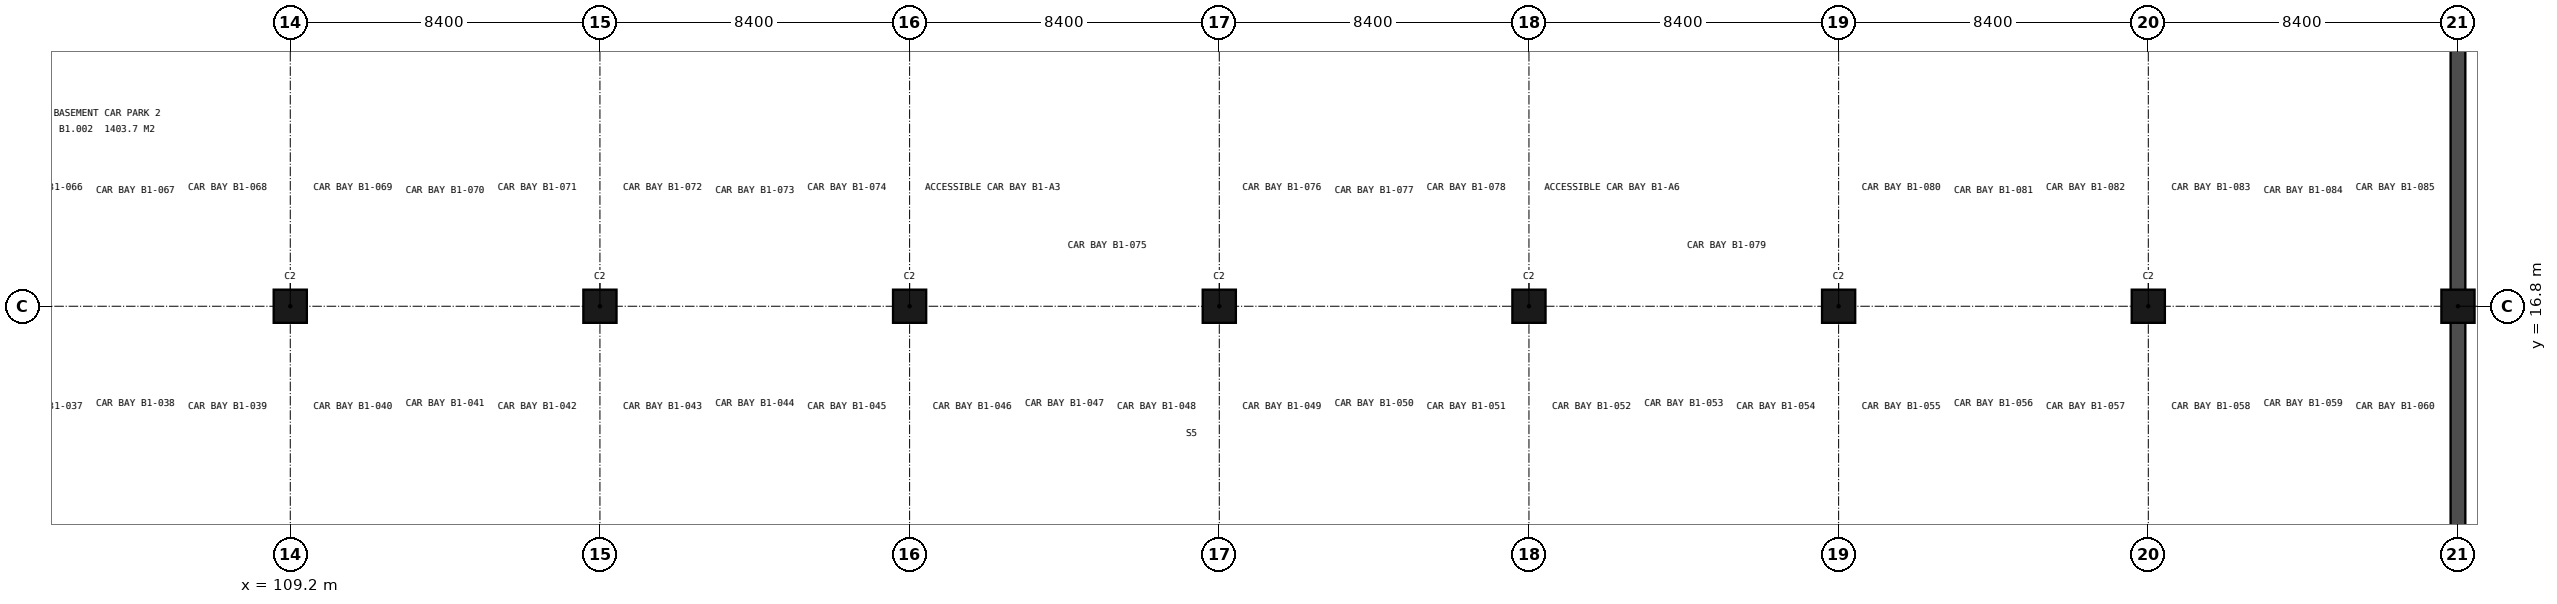
"""IFC4 building model, lengths in metres.
Left out: names, types, materials, properties, quantities, classifications, styles, units other than length and angle.
Written with IfcOpenShell. Run it as: python <this file> out.ifc"""

import sys

from ifc_helpers import new_model, si_unit, direction, frame, frame_2d, origin, origin_2d, place, context, subcontext, project, spatial, rectangle, extrude, element, save


model = new_model("IFC4")
c1 = context("Model", 3, precision=1e-05, world=origin(), true_north=direction((0.0, 1.0)))
c2 = subcontext(c1, "Body", "Model", "MODEL_VIEW")
j1 = project(units=[si_unit("LENGTHUNIT", "METRE"), si_unit("PLANEANGLEUNIT", "RADIAN")], contexts=[c1])
p1 = place(None, origin())
s1 = spatial("IfcSite", under=j1, at=p1, CompositionType="ELEMENT")
p2 = place(p1, origin())
s2 = spatial("IfcBuilding", under=s1, at=p2, CompositionType="ELEMENT")
p3 = place(p2, frame((0.0, 0.0, -4.8)))
s3 = spatial("IfcBuildingStorey", under=s2, at=p3, CompositionType="ELEMENT", Elevation=-4.8)
for number, where, z_axis, x_axis in (
    (1, (109.2, 16.8, -0.3), (0.0, 0.0, 1.0), (1.0, 0.0, 0.0)),
    (2, (117.6, 16.8, -0.3), (0.0, 0.0, 1.0), (1.0, 0.0, 0.0)),
    (3, (126.0, 16.8, -0.3), (0.0, 0.0, 1.0), (1.0, 0.0, 0.0)),
    (4, (134.4, 16.8, -0.3), (0.0, 0.0, 1.0), (1.0, 0.0, 0.0)),
    (5, (142.8, 16.8, -0.3), (0.0, 0.0, 1.0), (1.0, 0.0, 0.0)),
    (6, (151.2, 16.8, -0.3), (0.0, 0.0, 1.0), (1.0, 0.0, 0.0)),
    (7, (159.6, 16.8, -0.3), (0.0, 0.0, 1.0), (1.0, 0.0, 0.0)),
    (8, (168.0, 16.8, -0.3), (0.0, 0.0, 1.0), (1.0, 0.0, 0.0)),
):
    element("IfcColumn", number, at=place(p3, frame(where, z_axis=z_axis, x_axis=x_axis)), inside=s3, PredefinedType="COLUMN", context=c2, shape_type="SweptSolid", body=[
        extrude(rectangle(XDim=0.9, YDim=0.9, at=origin_2d()), origin(), (0.0, 0.0, 1.0), 4.8),
    ])
p4 = place(p3, frame((168.0, -0.2, -0.3), z_axis=(0.0, 0.0, 1.0), x_axis=(0.0, 1.0, 0.0)))
e9 = element("IfcWall", 9, at=p4, inside=s3, PredefinedType="SOLIDWALL", context=c2, shape_type="SweptSolid", body=[
    extrude(rectangle(XDim=118.0, YDim=0.4, at=frame_2d((59.0, 0.0))), origin(), (0.0, 0.0, 1.0), 4.8),
])
save(model, sys.argv[1])
